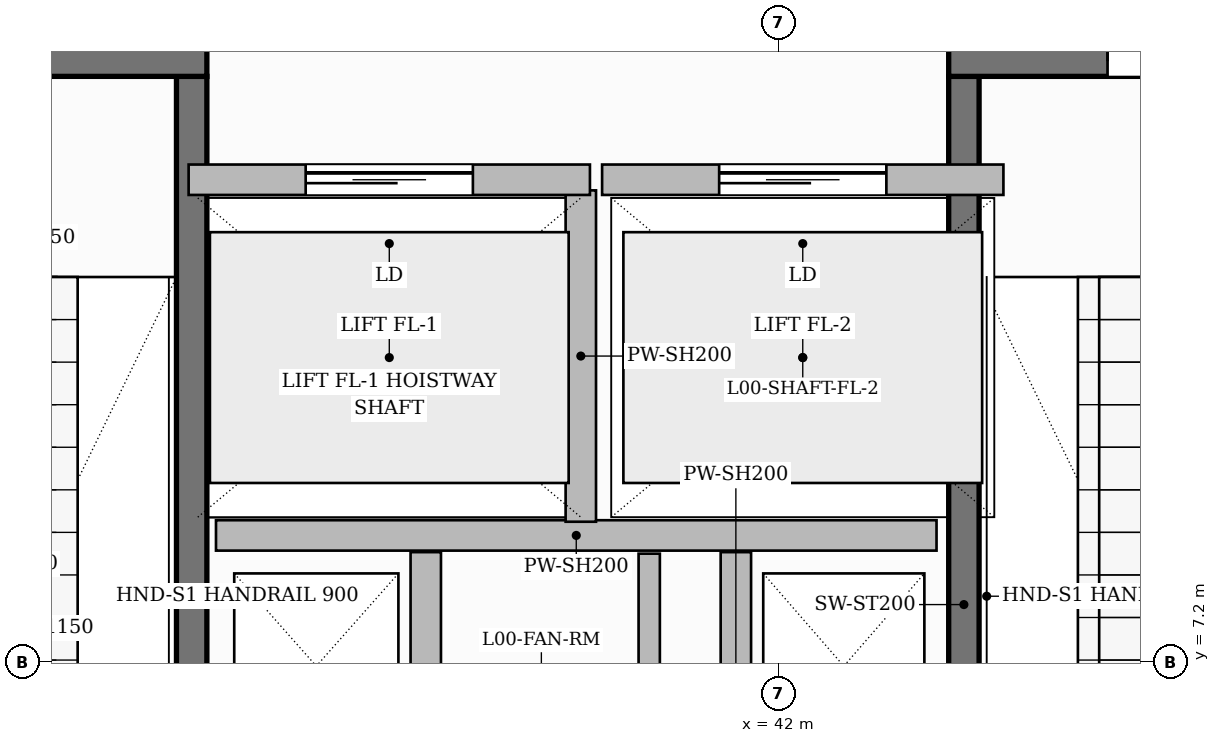
"""IFC4 building model, lengths in metres.
Left out: names, types, materials, properties, quantities, classifications, styles, units other than length and angle.
Written with IfcOpenShell. Run it as: python <this file> out.ifc"""

import sys

from ifc_helpers import new_model, si_unit, direction, frame, frame_2d, origin, place, context, subcontext, project, spatial, rectangle, extrude, source, transform, mapped, element, fill, save


model = new_model("IFC4")
c1 = context("Model", 3, precision=1e-05, world=origin(), true_north=direction((0.0, 1.0)))
c2 = subcontext(c1, "Body", "Model", "MODEL_VIEW")
j1 = project(units=[si_unit("LENGTHUNIT", "METRE"), si_unit("PLANEANGLEUNIT", "RADIAN")], contexts=[c1])
p1 = place(None, origin())
s1 = spatial("IfcSite", under=j1, at=p1, CompositionType="ELEMENT")
p2 = place(p1, origin())
s2 = spatial("IfcBuilding", under=s1, at=p2, CompositionType="ELEMENT")
p3 = place(p2, origin())
s3 = spatial("IfcBuildingStorey", under=s2, at=p3, CompositionType="ELEMENT", Elevation=0.0)
p4 = place(p3, frame((38.14, 4.1, 0.0), z_axis=(0.0, 0.0, 1.0), x_axis=(0.0, 1.0, 0.0)))
e1 = element("IfcWall", 1, at=p4, inside=s3, PredefinedType="SHEAR", context=c2, shape_type="SweptSolid", body=[
    extrude(rectangle(XDim=6.95, YDim=0.2, at=frame_2d((3.475, 0.0))), origin(), (0.0, 0.0, 1.0), 5.4),
])
p5 = place(p3, frame((35.1, 11.15, 0.0), z_axis=(0.0, 0.0, 1.0), x_axis=(1.0, 0.0, 0.0)))
e2 = element("IfcWall", 2, at=p5, inside=s3, PredefinedType="SHEAR", context=c2, shape_type="SweptSolid", body=[
    extrude(rectangle(XDim=3.14, YDim=0.2, at=frame_2d((1.57, 0.0))), origin(), (0.0, 0.0, 1.0), 5.4),
])
p6 = place(p5, frame((1.045, 0.0, 0.0)))
e3 = element("IfcOpeningElement", 3, at=p6, cuts=e2, PredefinedType="OPENING", context=c2, shape_type="SweptSolid", body=[
    extrude(rectangle(XDim=1.05, YDim=2.2, at=frame_2d((0.525, 1.1))), frame((0.0, 0.11, 0.0), z_axis=(0.0, -1.0, 0.0), x_axis=(1.0, 0.0, 0.0)), (0.0, 0.0, 1.0), 0.22),
])
p7 = place(p3, frame((43.22, 4.1, 0.0), z_axis=(0.0, 0.0, 1.0), x_axis=(0.0, 1.0, 0.0)))
e4 = element("IfcWall", 4, at=p7, inside=s3, PredefinedType="SHEAR", context=c2, shape_type="SweptSolid", body=[
    extrude(rectangle(XDim=6.95, YDim=0.2, at=frame_2d((3.475, 0.0))), origin(), (0.0, 0.0, 1.0), 5.4),
])
p8 = place(p3, frame((43.12, 11.15, 0.0), z_axis=(0.0, 0.0, 1.0), x_axis=(1.0, 0.0, 0.0)))
e5 = element("IfcWall", 5, at=p8, inside=s3, PredefinedType="SHEAR", context=c2, shape_type="SweptSolid", body=[
    extrude(rectangle(XDim=6.38, YDim=0.2, at=frame_2d((3.19, 0.0))), origin(), (0.0, 0.0, 1.0), 5.4),
])
p9 = place(p8, frame((1.045, 0.0, 0.0)))
e6 = element("IfcOpeningElement", 6, at=p9, cuts=e5, PredefinedType="OPENING", context=c2, shape_type="SweptSolid", body=[
    extrude(rectangle(XDim=1.05, YDim=2.2, at=frame_2d((0.525, 1.1))), frame((0.0, 0.11, 0.0), z_axis=(0.0, -1.0, 0.0), x_axis=(1.0, 0.0, 0.0)), (0.0, 0.0, 1.0), 0.22),
])
p10 = place(p8, frame((4.125, 0.0, 0.0)))
e7 = element("IfcOpeningElement", 7, at=p10, cuts=e5, PredefinedType="OPENING", context=c2, shape_type="SweptSolid", body=[
    extrude(rectangle(XDim=1.05, YDim=2.2, at=frame_2d((0.525, 1.1))), frame((0.0, 0.11, 0.0), z_axis=(0.0, -1.0, 0.0), x_axis=(1.0, 0.0, 0.0)), (0.0, 0.0, 1.0), 0.22),
])
p11 = place(p3, frame((38.3, 8.03, 0.0), z_axis=(0.0, 0.0, 1.0), x_axis=(1.0, 0.0, 0.0)))
e8 = element("IfcWall", 8, at=p11, inside=s3, PredefinedType="PARTITIONING", context=c2, shape_type="SweptSolid", body=[
    extrude(rectangle(XDim=4.74, YDim=0.2, at=frame_2d((2.37, 0.0))), origin(), (0.0, 0.0, 1.0), 5.1),
])
p12 = place(p3, frame((40.7, 8.12, 0.0), z_axis=(0.0, 0.0, 1.0), x_axis=(0.0, 1.0, 0.0)))
e9 = element("IfcWall", 9, at=p12, inside=s3, PredefinedType="PARTITIONING", context=c2, shape_type="SweptSolid", body=[
    extrude(rectangle(XDim=2.18, YDim=0.2, at=frame_2d((1.09, 0.0))), origin(), (0.0, 0.0, 1.0), 5.1),
])
for number, where, z_axis, x_axis in (
    (10, (39.68, 6.13, 0.0), (0.0, 0.0, 1.0), (0.0, 1.0, 0.0)),
    (11, (41.72, 6.13, 0.0), (0.0, 0.0, 1.0), (0.0, 1.0, 0.0)),
):
    element("IfcWall", number, at=place(p3, frame(where, z_axis=z_axis, x_axis=x_axis)), inside=s3, PredefinedType="PARTITIONING", context=c2, shape_type="SweptSolid", body=[
        extrude(rectangle(XDim=1.79, YDim=0.2, at=frame_2d((0.895, 0.0))), origin(), (0.0, 0.0, 1.0), 5.1),
    ])
p13 = place(p3, frame((41.15, 3.92, 0.0), z_axis=(0.0, 0.0, 1.0), x_axis=(0.0, 1.0, 0.0)))
e12 = element("IfcWall", 12, at=p13, inside=s3, PredefinedType="PARTITIONING", context=c2, shape_type="SweptSolid", body=[
    extrude(rectangle(XDim=3.99, YDim=0.14, at=frame_2d((1.995, 0.0))), origin(), (0.0, 0.0, 1.0), 5.1),
])
p14 = place(p3, frame((38.12, 10.37, 0.0), z_axis=(0.0, 0.0, 1.0), x_axis=(1.0, 0.0, 0.0)))
e13 = element("IfcWall", 13, at=p14, inside=s3, PredefinedType="PARTITIONING", context=c2, shape_type="SweptSolid", body=[
    extrude(rectangle(XDim=2.64, YDim=0.2, at=frame_2d((1.32, 0.0))), origin(), (0.0, 0.0, 1.0), 5.1),
])
p15 = place(p14, frame((0.77, 0.0, 0.0)))
e14 = element("IfcOpeningElement", 14, at=p15, cuts=e13, PredefinedType="OPENING", context=c2, shape_type="SweptSolid", body=[
    extrude(rectangle(XDim=1.1, YDim=2.2, at=frame_2d((0.55, 1.1))), frame((0.0, 0.11, 0.0), z_axis=(0.0, -1.0, 0.0), x_axis=(1.0, 0.0, 0.0)), (0.0, 0.0, 1.0), 0.22),
])
p16 = place(p3, frame((40.84, 10.37, 0.0), z_axis=(0.0, 0.0, 1.0), x_axis=(1.0, 0.0, 0.0)))
e15 = element("IfcWall", 15, at=p16, inside=s3, PredefinedType="PARTITIONING", context=c2, shape_type="SweptSolid", body=[
    extrude(rectangle(XDim=2.64, YDim=0.2, at=frame_2d((1.32, 0.0))), origin(), (0.0, 0.0, 1.0), 5.1),
])
p17 = place(p16, frame((0.77, 0.0, 0.0)))
e16 = element("IfcOpeningElement", 16, at=p17, cuts=e15, PredefinedType="OPENING", context=c2, shape_type="SweptSolid", body=[
    extrude(rectangle(XDim=1.1, YDim=2.2, at=frame_2d((0.55, 1.1))), frame((0.0, 0.11, 0.0), z_axis=(0.0, -1.0, 0.0), x_axis=(1.0, 0.0, 0.0)), (0.0, 0.0, 1.0), 0.22),
])
m1 = source(origin(), c2, "Body", "SweptSolid", [
    extrude(rectangle(XDim=1.05, YDim=2.2, at=frame_2d((0.525, 1.1))), frame((0.0, 0.025, 0.0), z_axis=(0.0, -1.0, 0.0), x_axis=(1.0, 0.0, 0.0)), (0.0, 0.0, 1.0), 0.05),
])
p18 = place(p9, origin())
e17 = element("IfcDoor", 17, at=p18, inside=s3, OperationType="SINGLE_SWING_LEFT", PredefinedType="DOOR", context=c2, shape_type="MappedRepresentation", body=[
    mapped(m1, transform((0.0, 0.0, 0.0), scale=1.0)),
])
fill(e6, e17)
m2 = source(origin(), c2, "Body", "SweptSolid", [
    extrude(rectangle(XDim=1.1, YDim=2.2, at=frame_2d((0.55, 1.1))), frame((0.0, 0.025, 0.0), z_axis=(0.0, -1.0, 0.0), x_axis=(1.0, 0.0, 0.0)), (0.0, 0.0, 1.0), 0.05),
])
p19 = place(p15, origin())
e18 = element("IfcDoor", 18, at=p19, inside=s3, OperationType="SLIDING_TO_LEFT", PredefinedType="DOOR", context=c2, shape_type="MappedRepresentation", body=[
    mapped(m2, transform((0.0, 0.0, 0.0), scale=1.0)),
])
fill(e14, e18)
p20 = place(p17, origin())
e19 = element("IfcDoor", 19, at=p20, inside=s3, OperationType="SLIDING_TO_LEFT", PredefinedType="DOOR", context=c2, shape_type="MappedRepresentation", body=[
    mapped(m2, transform((0.0, 0.0, 0.0), scale=1.0)),
])
fill(e16, e19)
save(model, sys.argv[1])
